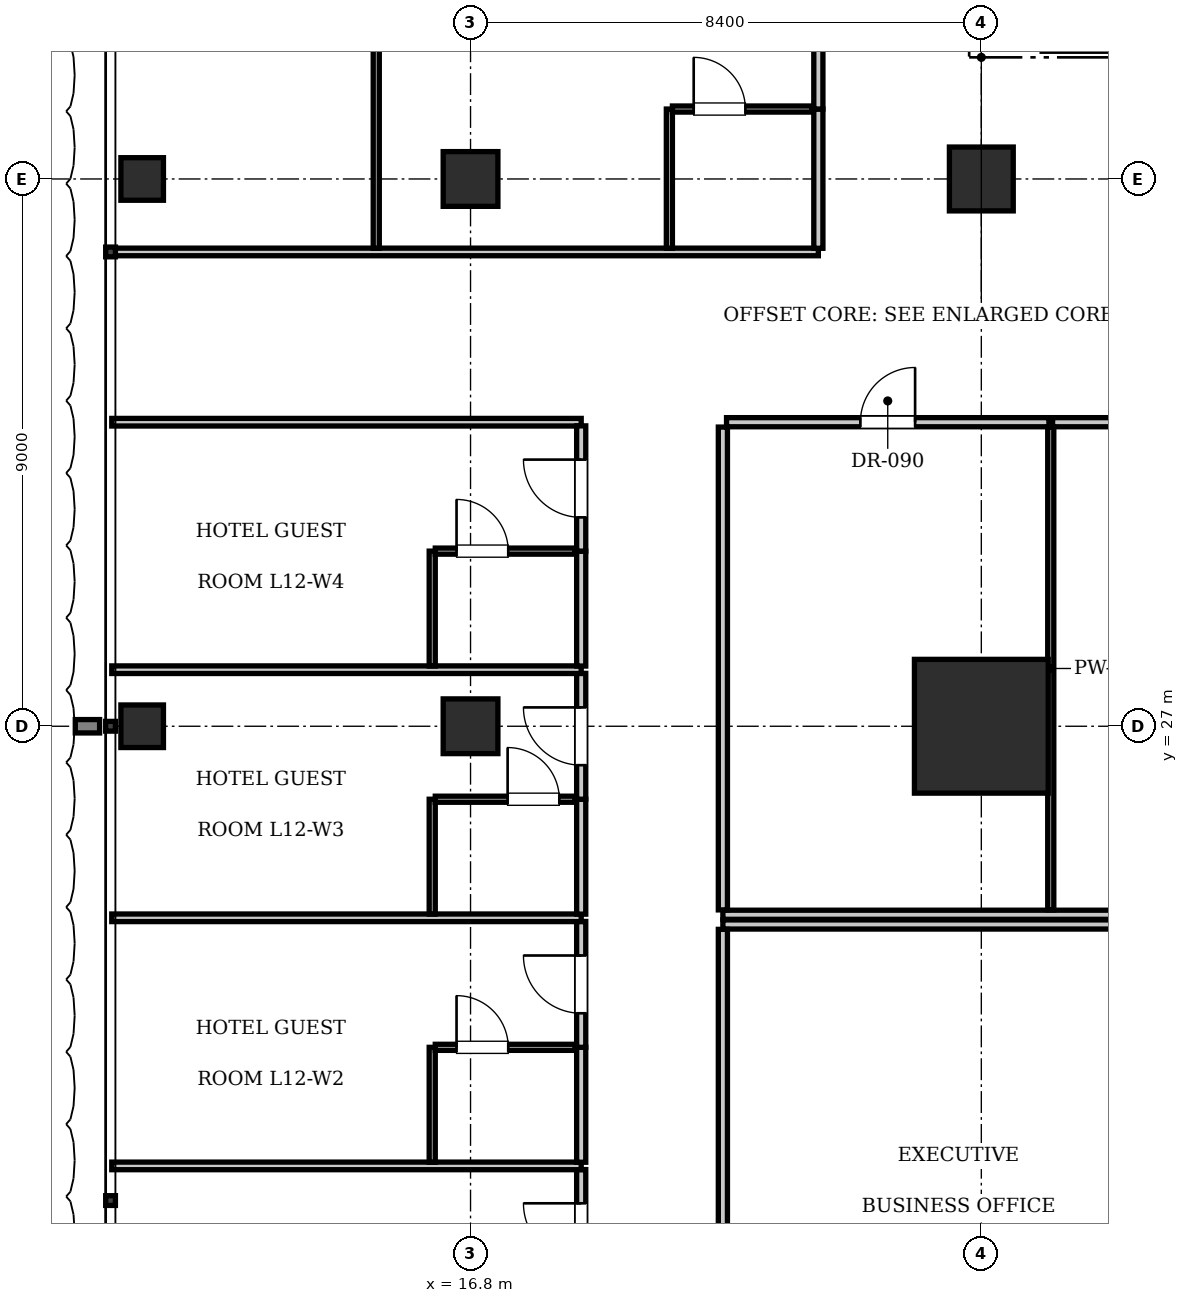
"""IFC4 building model, lengths in metres.
Left out: names, types, materials, properties, quantities, classifications, styles, units other than length and angle.
Written with IfcOpenShell. Run it as: python <this file> out.ifc"""

import sys

from ifc_helpers import new_model, si_unit, direction, frame, frame_2d, origin, origin_2d, place, context, subcontext, project, spatial, rectangle, i_section, extrude, element, fill, save


model = new_model("IFC4")
c1 = context("Model", 3, precision=1e-05, world=origin(), true_north=direction((0.0, 1.0)))
c2 = subcontext(c1, "Body", "Model", "MODEL_VIEW")
j1 = project(units=[si_unit("LENGTHUNIT", "METRE"), si_unit("PLANEANGLEUNIT", "RADIAN")], contexts=[c1])
p1 = place(None, origin())
s1 = spatial("IfcSite", under=j1, at=p1, CompositionType="ELEMENT")
p2 = place(p1, origin())
s2 = spatial("IfcBuilding", under=s1, at=p2, CompositionType="ELEMENT")
p3 = place(p2, frame((0.0, 0.0, 53.9)))
s3 = spatial("IfcBuildingStorey", under=s2, at=p3, CompositionType="ELEMENT", Elevation=53.9)
p4 = place(p3, frame((25.2, 27.0, 0.0), z_axis=(0.0, 0.0, 1.0), x_axis=(1.0, 0.0, 0.0)))
e1 = element("IfcColumn", 1, at=p4, inside=s3, PredefinedType="COLUMN", context=c2, shape_type="SweptSolid", body=[
    extrude(rectangle(XDim=2.2, YDim=2.2, at=origin_2d()), origin(), (0.0, 0.0, 1.0), 3.85),
])
p5 = place(p3, frame((25.2, 36.0, 0.0), z_axis=(0.0, 0.0, 1.0), x_axis=(1.0, 0.0, 0.0)))
e2 = element("IfcColumn", 2, at=p5, inside=s3, PredefinedType="COLUMN", context=c2, shape_type="SweptSolid", body=[
    extrude(rectangle(XDim=1.05, YDim=1.05, at=origin_2d()), origin(), (0.0, 0.0, 1.0), 3.85),
])
for number, where, z_axis, x_axis in (
    (3, (16.8, 27.0, 0.0), (0.0, 0.0, 1.0), (1.0, 0.0, 0.0)),
    (4, (16.8, 36.0, 0.0), (0.0, 0.0, 1.0), (1.0, 0.0, 0.0)),
):
    element("IfcColumn", number, at=place(p3, frame(where, z_axis=z_axis, x_axis=x_axis)), inside=s3, PredefinedType="COLUMN", context=c2, shape_type="SweptSolid", body=[
        extrude(rectangle(XDim=0.9, YDim=0.9, at=origin_2d()), origin(), (0.0, 0.0, 1.0), 3.85),
    ])
for number, where, z_axis, x_axis in (
    (5, (11.4, 27.0, 0.0), (0.0, 0.0, 1.0), (1.0, 0.0, 0.0)),
    (6, (11.4, 36.0, 0.0), (0.0, 0.0, 1.0), (1.0, 0.0, 0.0)),
):
    element("IfcColumn", number, at=place(p3, frame(where, z_axis=z_axis, x_axis=x_axis)), inside=s3, PredefinedType="COLUMN", context=c2, shape_type="SweptSolid", body=[
        extrude(i_section(OverallWidth=0.7, OverallDepth=0.7, WebThickness=0.028, FlangeThickness=0.044, at=origin_2d()), origin(), (0.0, 0.0, 1.0), 3.85),
    ])
p6 = place(p3, frame((20.95, 23.9, 0.0), z_axis=(0.0, 0.0, 1.0), x_axis=(1.0, 0.0, 0.0)))
e7 = element("IfcWall", 7, at=p6, inside=s3, PredefinedType="PARTITIONING", context=c2, shape_type="SweptSolid", body=[
    extrude(rectangle(XDim=33.7, YDim=0.15, at=frame_2d((16.85, 0.0))), origin(), (0.0, 0.0, 1.0), 3.61),
])
p7 = place(p3, frame((20.95, 23.98, 0.0), z_axis=(0.0, 0.0, 1.0), x_axis=(0.0, 1.0, 0.0)))
e8 = element("IfcWall", 8, at=p7, inside=s3, PredefinedType="PARTITIONING", context=c2, shape_type="SweptSolid", body=[
    extrude(rectangle(XDim=7.94, YDim=0.15, at=frame_2d((3.97, 0.0))), origin(), (0.0, 0.0, 1.0), 3.207),
])
p8 = place(p3, frame((21.01, 32.0, 0.0), z_axis=(0.0, 0.0, 1.0), x_axis=(1.0, 0.0, 0.0)))
e9 = element("IfcWall", 9, at=p8, inside=s3, PredefinedType="PARTITIONING", context=c2, shape_type="SweptSolid", body=[
    extrude(rectangle(XDim=5.302, YDim=0.15, at=frame_2d((2.651, 0.0))), origin(), (0.0, 0.0, 1.0), 3.61),
])
p9 = place(p8, frame((2.201, 0.0, 0.0)))
e10 = element("IfcOpeningElement", 10, at=p9, cuts=e9, PredefinedType="OPENING", context=c2, shape_type="SweptSolid", body=[
    extrude(rectangle(XDim=0.9, YDim=2.1, at=frame_2d((0.45, 1.05))), frame((0.0, 0.085, 0.0), z_axis=(0.0, -1.0, 0.0), x_axis=(1.0, 0.0, 0.0)), (0.0, 0.0, 1.0), 0.17),
])
p10 = place(p3, frame((26.342, 23.98, 0.0), z_axis=(0.0, 0.0, 1.0), x_axis=(0.0, 1.0, 0.0)))
e11 = element("IfcWall", 11, at=p10, inside=s3, PredefinedType="PARTITIONING", context=c2, shape_type="SweptSolid", body=[
    extrude(rectangle(XDim=7.94, YDim=0.1, at=frame_2d((3.97, 0.0))), origin(), (0.0, 0.0, 1.0), 3.61),
])
p11 = place(p3, frame((26.372, 32.0, 0.0), z_axis=(0.0, 0.0, 1.0), x_axis=(1.0, 0.0, 0.0)))
e12 = element("IfcWall", 12, at=p11, inside=s3, PredefinedType="PARTITIONING", context=c2, shape_type="SweptSolid", body=[
    extrude(rectangle(XDim=7.354, YDim=0.15, at=frame_2d((3.677, 0.0))), origin(), (0.0, 0.0, 1.0), 3.61),
])
p12 = place(p11, frame((3.227, 0.0, 0.0)))
e13 = element("IfcOpeningElement", 13, at=p12, cuts=e12, PredefinedType="OPENING", context=c2, shape_type="SweptSolid", body=[
    extrude(rectangle(XDim=0.9, YDim=2.1, at=frame_2d((0.45, 1.05))), frame((0.0, 0.085, 0.0), z_axis=(0.0, -1.0, 0.0), x_axis=(1.0, 0.0, 0.0)), (0.0, 0.0, 1.0), 0.17),
])
p13 = place(p3, frame((20.95, 23.74, 0.0), z_axis=(0.0, 0.0, 1.0), x_axis=(1.0, 0.0, 0.0)))
e14 = element("IfcWall", 14, at=p13, inside=s3, PredefinedType="PARTITIONING", context=c2, shape_type="SweptSolid", body=[
    extrude(rectangle(XDim=33.7, YDim=0.15, at=frame_2d((16.85, 0.0))), origin(), (0.0, 0.0, 1.0), 3.61),
])
p14 = place(p3, frame((20.95, 15.73, 0.0), z_axis=(0.0, 0.0, 1.0), x_axis=(0.0, 1.0, 0.0)))
e15 = element("IfcWall", 15, at=p14, inside=s3, PredefinedType="PARTITIONING", context=c2, shape_type="SweptSolid", body=[
    extrude(rectangle(XDim=7.93, YDim=0.15, at=frame_2d((3.965, 0.0))), origin(), (0.0, 0.0, 1.0), 3.207),
])
p15 = place(p3, frame((10.9, 32.0, 0.0), z_axis=(0.0, 0.0, 1.0), x_axis=(1.0, 0.0, 0.0)))
e16 = element("IfcWall", 16, at=p15, inside=s3, PredefinedType="PARTITIONING", context=c2, shape_type="SweptSolid", body=[
    extrude(rectangle(XDim=7.72, YDim=0.125, at=frame_2d((3.86, 0.0))), origin(), (0.0, 0.0, 1.0), 3.61),
])
p16 = place(p3, frame((18.62, 17.65, 0.0), z_axis=(0.0, 0.0, 1.0), x_axis=(0.0, 1.0, 0.0)))
e17 = element("IfcWall", 17, at=p16, inside=s3, PredefinedType="PARTITIONING", context=c2, shape_type="SweptSolid", body=[
    extrude(rectangle(XDim=2.06, YDim=0.15, at=frame_2d((1.03, 0.0))), origin(), (0.0, 0.0, 1.0), 3.61),
])
p17 = place(p16, frame((0.555, 0.0, 0.0)))
e18 = element("IfcOpeningElement", 18, at=p17, cuts=e17, PredefinedType="OPENING", context=c2, shape_type="SweptSolid", body=[
    extrude(rectangle(XDim=0.95, YDim=2.15, at=frame_2d((0.475, 1.075))), frame((0.0, 0.085, 0.0), z_axis=(0.0, -1.0, 0.0), x_axis=(1.0, 0.0, 0.0)), (0.0, 0.0, 1.0), 0.17),
])
p18 = place(p3, frame((10.9, 19.77, 0.0), z_axis=(0.0, 0.0, 1.0), x_axis=(1.0, 0.0, 0.0)))
e19 = element("IfcWall", 19, at=p18, inside=s3, PredefinedType="PARTITIONING", context=c2, shape_type="SweptSolid", body=[
    extrude(rectangle(XDim=7.72, YDim=0.125, at=frame_2d((3.86, 0.0))), origin(), (0.0, 0.0, 1.0), 3.61),
])
p19 = place(p3, frame((18.62, 19.83, 0.0), z_axis=(0.0, 0.0, 1.0), x_axis=(0.0, 1.0, 0.0)))
e20 = element("IfcWall", 20, at=p19, inside=s3, PredefinedType="PARTITIONING", context=c2, shape_type="SweptSolid", body=[
    extrude(rectangle(XDim=1.89, YDim=0.15, at=frame_2d((0.945, 0.0))), origin(), (0.0, 0.0, 1.0), 3.61),
])
p20 = place(p3, frame((18.62, 21.72, 0.0), z_axis=(0.0, 0.0, 1.0), x_axis=(0.0, 1.0, 0.0)))
e21 = element("IfcWall", 21, at=p20, inside=s3, PredefinedType="PARTITIONING", context=c2, shape_type="SweptSolid", body=[
    extrude(rectangle(XDim=2.07, YDim=0.15, at=frame_2d((1.035, 0.0))), origin(), (0.0, 0.0, 1.0), 3.61),
])
p21 = place(p20, frame((0.56, 0.0, 0.0)))
e22 = element("IfcOpeningElement", 22, at=p21, cuts=e21, PredefinedType="OPENING", context=c2, shape_type="SweptSolid", body=[
    extrude(rectangle(XDim=0.95, YDim=2.15, at=frame_2d((0.475, 1.075))), frame((0.0, 0.085, 0.0), z_axis=(0.0, -1.0, 0.0), x_axis=(1.0, 0.0, 0.0)), (0.0, 0.0, 1.0), 0.17),
])
p22 = place(p3, frame((16.17, 19.83, 0.0), z_axis=(0.0, 0.0, 1.0), x_axis=(0.0, 1.0, 0.0)))
e23 = element("IfcWall", 23, at=p22, inside=s3, PredefinedType="PARTITIONING", context=c2, shape_type="SweptSolid", body=[
    extrude(rectangle(XDim=1.89, YDim=0.1, at=frame_2d((0.945, 0.0))), origin(), (0.0, 0.0, 1.0), 3.61),
])
p23 = place(p3, frame((16.22, 21.72, 0.0), z_axis=(0.0, 0.0, 1.0), x_axis=(1.0, 0.0, 0.0)))
e24 = element("IfcWall", 24, at=p23, inside=s3, PredefinedType="PARTITIONING", context=c2, shape_type="SweptSolid", body=[
    extrude(rectangle(XDim=2.3, YDim=0.1, at=frame_2d((1.15, 0.0))), origin(), (0.0, 0.0, 1.0), 3.61),
])
p24 = place(p23, frame((0.35, 0.0, 0.0)))
e25 = element("IfcOpeningElement", 25, at=p24, cuts=e24, PredefinedType="OPENING", context=c2, shape_type="SweptSolid", body=[
    extrude(rectangle(XDim=0.85, YDim=2.1, at=frame_2d((0.425, 1.05))), frame((0.0, 0.06, 0.0), z_axis=(0.0, -1.0, 0.0), x_axis=(1.0, 0.0, 0.0)), (0.0, 0.0, 1.0), 0.12),
])
p25 = place(p3, frame((10.9, 23.85, 0.0), z_axis=(0.0, 0.0, 1.0), x_axis=(1.0, 0.0, 0.0)))
e26 = element("IfcWall", 26, at=p25, inside=s3, PredefinedType="PARTITIONING", context=c2, shape_type="SweptSolid", body=[
    extrude(rectangle(XDim=7.72, YDim=0.125, at=frame_2d((3.86, 0.0))), origin(), (0.0, 0.0, 1.0), 3.61),
])
p26 = place(p3, frame((18.62, 23.91, 0.0), z_axis=(0.0, 0.0, 1.0), x_axis=(0.0, 1.0, 0.0)))
e27 = element("IfcWall", 27, at=p26, inside=s3, PredefinedType="PARTITIONING", context=c2, shape_type="SweptSolid", body=[
    extrude(rectangle(XDim=1.89, YDim=0.15, at=frame_2d((0.945, 0.0))), origin(), (0.0, 0.0, 1.0), 3.61),
])
p27 = place(p3, frame((18.62, 25.8, 0.0), z_axis=(0.0, 0.0, 1.0), x_axis=(0.0, 1.0, 0.0)))
e28 = element("IfcWall", 28, at=p27, inside=s3, PredefinedType="PARTITIONING", context=c2, shape_type="SweptSolid", body=[
    extrude(rectangle(XDim=2.07, YDim=0.15, at=frame_2d((1.035, 0.0))), origin(), (0.0, 0.0, 1.0), 3.61),
])
p28 = place(p27, frame((0.56, 0.0, 0.0)))
e29 = element("IfcOpeningElement", 29, at=p28, cuts=e28, PredefinedType="OPENING", context=c2, shape_type="SweptSolid", body=[
    extrude(rectangle(XDim=0.95, YDim=2.15, at=frame_2d((0.475, 1.075))), frame((0.0, 0.085, 0.0), z_axis=(0.0, -1.0, 0.0), x_axis=(1.0, 0.0, 0.0)), (0.0, 0.0, 1.0), 0.17),
])
p29 = place(p3, frame((16.17, 23.91, 0.0), z_axis=(0.0, 0.0, 1.0), x_axis=(0.0, 1.0, 0.0)))
e30 = element("IfcWall", 30, at=p29, inside=s3, PredefinedType="PARTITIONING", context=c2, shape_type="SweptSolid", body=[
    extrude(rectangle(XDim=1.89, YDim=0.1, at=frame_2d((0.945, 0.0))), origin(), (0.0, 0.0, 1.0), 3.61),
])
p30 = place(p3, frame((16.22, 25.8, 0.0), z_axis=(0.0, 0.0, 1.0), x_axis=(1.0, 0.0, 0.0)))
e31 = element("IfcWall", 31, at=p30, inside=s3, PredefinedType="PARTITIONING", context=c2, shape_type="SweptSolid", body=[
    extrude(rectangle(XDim=2.3, YDim=0.1, at=frame_2d((1.15, 0.0))), origin(), (0.0, 0.0, 1.0), 3.61),
])
p31 = place(p30, frame((1.19, 0.0, 0.0)))
e32 = element("IfcOpeningElement", 32, at=p31, cuts=e31, PredefinedType="OPENING", context=c2, shape_type="SweptSolid", body=[
    extrude(rectangle(XDim=0.85, YDim=2.1, at=frame_2d((0.425, 1.05))), frame((0.0, 0.06, 0.0), z_axis=(0.0, -1.0, 0.0), x_axis=(1.0, 0.0, 0.0)), (0.0, 0.0, 1.0), 0.12),
])
p32 = place(p3, frame((10.9, 27.93, 0.0), z_axis=(0.0, 0.0, 1.0), x_axis=(1.0, 0.0, 0.0)))
e33 = element("IfcWall", 33, at=p32, inside=s3, PredefinedType="PARTITIONING", context=c2, shape_type="SweptSolid", body=[
    extrude(rectangle(XDim=7.72, YDim=0.125, at=frame_2d((3.86, 0.0))), origin(), (0.0, 0.0, 1.0), 3.61),
])
p33 = place(p3, frame((18.62, 27.99, 0.0), z_axis=(0.0, 0.0, 1.0), x_axis=(0.0, 1.0, 0.0)))
e34 = element("IfcWall", 34, at=p33, inside=s3, PredefinedType="PARTITIONING", context=c2, shape_type="SweptSolid", body=[
    extrude(rectangle(XDim=1.89, YDim=0.15, at=frame_2d((0.945, 0.0))), origin(), (0.0, 0.0, 1.0), 3.61),
])
p34 = place(p3, frame((18.62, 29.88, 0.0), z_axis=(0.0, 0.0, 1.0), x_axis=(0.0, 1.0, 0.0)))
e35 = element("IfcWall", 35, at=p34, inside=s3, PredefinedType="PARTITIONING", context=c2, shape_type="SweptSolid", body=[
    extrude(rectangle(XDim=2.06, YDim=0.15, at=frame_2d((1.03, 0.0))), origin(), (0.0, 0.0, 1.0), 3.61),
])
p35 = place(p34, frame((0.555, 0.0, 0.0)))
e36 = element("IfcOpeningElement", 36, at=p35, cuts=e35, PredefinedType="OPENING", context=c2, shape_type="SweptSolid", body=[
    extrude(rectangle(XDim=0.95, YDim=2.15, at=frame_2d((0.475, 1.075))), frame((0.0, 0.085, 0.0), z_axis=(0.0, -1.0, 0.0), x_axis=(1.0, 0.0, 0.0)), (0.0, 0.0, 1.0), 0.17),
])
p36 = place(p3, frame((16.17, 27.99, 0.0), z_axis=(0.0, 0.0, 1.0), x_axis=(0.0, 1.0, 0.0)))
e37 = element("IfcWall", 37, at=p36, inside=s3, PredefinedType="PARTITIONING", context=c2, shape_type="SweptSolid", body=[
    extrude(rectangle(XDim=1.89, YDim=0.1, at=frame_2d((0.945, 0.0))), origin(), (0.0, 0.0, 1.0), 3.61),
])
p37 = place(p3, frame((16.22, 29.88, 0.0), z_axis=(0.0, 0.0, 1.0), x_axis=(1.0, 0.0, 0.0)))
e38 = element("IfcWall", 38, at=p37, inside=s3, PredefinedType="PARTITIONING", context=c2, shape_type="SweptSolid", body=[
    extrude(rectangle(XDim=2.3, YDim=0.1, at=frame_2d((1.15, 0.0))), origin(), (0.0, 0.0, 1.0), 3.61),
])
p38 = place(p37, frame((0.35, 0.0, 0.0)))
e39 = element("IfcOpeningElement", 39, at=p38, cuts=e38, PredefinedType="OPENING", context=c2, shape_type="SweptSolid", body=[
    extrude(rectangle(XDim=0.85, YDim=2.1, at=frame_2d((0.425, 1.05))), frame((0.0, 0.06, 0.0), z_axis=(0.0, -1.0, 0.0), x_axis=(1.0, 0.0, 0.0)), (0.0, 0.0, 1.0), 0.12),
])
p39 = place(p3, frame((10.9, 34.8, 0.0), z_axis=(0.0, 0.0, 1.0), x_axis=(1.0, 0.0, 0.0)))
e40 = element("IfcWall", 40, at=p39, inside=s3, PredefinedType="PARTITIONING", context=c2, shape_type="SweptSolid", body=[
    extrude(rectangle(XDim=11.62, YDim=0.125, at=frame_2d((5.81, 0.0))), origin(), (0.0, 0.0, 1.0), 3.61),
])
p40 = place(p3, frame((22.52, 34.86, 0.0), z_axis=(0.0, 0.0, 1.0), x_axis=(0.0, 1.0, 0.0)))
e41 = element("IfcWall", 41, at=p40, inside=s3, PredefinedType="PARTITIONING", context=c2, shape_type="SweptSolid", body=[
    extrude(rectangle(XDim=2.29, YDim=0.15, at=frame_2d((1.145, 0.0))), origin(), (0.0, 0.0, 1.0), 3.61),
])
p41 = place(p3, frame((22.52, 37.15, 0.0), z_axis=(0.0, 0.0, 1.0), x_axis=(0.0, 1.0, 0.0)))
e42 = element("IfcWall", 42, at=p41, inside=s3, PredefinedType="PARTITIONING", context=c2, shape_type="SweptSolid", body=[
    extrude(rectangle(XDim=5.359, YDim=0.15, at=frame_2d((2.679, 0.0))), origin(), (0.0, 0.0, 1.0), 3.61),
])
p42 = place(p41, frame((2.204, 0.0, 0.0)))
e43 = element("IfcOpeningElement", 43, at=p42, cuts=e42, PredefinedType="OPENING", context=c2, shape_type="SweptSolid", body=[
    extrude(rectangle(XDim=0.95, YDim=2.15, at=frame_2d((0.475, 1.075))), frame((0.0, 0.085, 0.0), z_axis=(0.0, -1.0, 0.0), x_axis=(1.0, 0.0, 0.0)), (0.0, 0.0, 1.0), 0.17),
])
p43 = place(p3, frame((20.07, 34.86, 0.0), z_axis=(0.0, 0.0, 1.0), x_axis=(0.0, 1.0, 0.0)))
e44 = element("IfcWall", 44, at=p43, inside=s3, PredefinedType="PARTITIONING", context=c2, shape_type="SweptSolid", body=[
    extrude(rectangle(XDim=2.29, YDim=0.1, at=frame_2d((1.145, 0.0))), origin(), (0.0, 0.0, 1.0), 3.61),
])
p44 = place(p3, frame((20.12, 37.15, 0.0), z_axis=(0.0, 0.0, 1.0), x_axis=(1.0, 0.0, 0.0)))
e45 = element("IfcWall", 45, at=p44, inside=s3, PredefinedType="PARTITIONING", context=c2, shape_type="SweptSolid", body=[
    extrude(rectangle(XDim=2.3, YDim=0.1, at=frame_2d((1.15, 0.0))), origin(), (0.0, 0.0, 1.0), 3.61),
])
p45 = place(p44, frame((0.35, 0.0, 0.0)))
e46 = element("IfcOpeningElement", 46, at=p45, cuts=e45, PredefinedType="OPENING", context=c2, shape_type="SweptSolid", body=[
    extrude(rectangle(XDim=0.85, YDim=2.1, at=frame_2d((0.425, 1.05))), frame((0.0, 0.06, 0.0), z_axis=(0.0, -1.0, 0.0), x_axis=(1.0, 0.0, 0.0)), (0.0, 0.0, 1.0), 0.12),
])
p46 = place(p3, frame((15.25, 34.86, 0.0), z_axis=(0.0, 0.0, 1.0), x_axis=(0.0, 1.0, 0.0)))
e47 = element("IfcWall", 47, at=p46, inside=s3, PredefinedType="PARTITIONING", context=c2, shape_type="SweptSolid", body=[
    extrude(rectangle(XDim=7.649, YDim=0.1, at=frame_2d((3.824, 0.0))), origin(), (0.0, 0.0, 1.0), 3.61),
])
p47 = place(p46, frame((3.374, 0.0, 0.0)))
e48 = element("IfcOpeningElement", 48, at=p47, cuts=e47, PredefinedType="OPENING", context=c2, shape_type="SweptSolid", body=[
    extrude(rectangle(XDim=0.9, YDim=2.1, at=frame_2d((0.45, 1.05))), frame((0.0, 0.06, 0.0), z_axis=(0.0, -1.0, 0.0), x_axis=(1.0, 0.0, 0.0)), (0.0, 0.0, 1.0), 0.12),
])
p48 = place(p9, origin())
e49 = element("IfcDoor", 49, at=p48, inside=s3, OperationType="SINGLE_SWING_RIGHT", PredefinedType="DOOR", context=c2, shape_type="SweptSolid", body=[
    extrude(rectangle(XDim=0.9, YDim=2.1, at=frame_2d((0.45, 1.05))), frame((0.0, 0.025, 0.0), z_axis=(0.0, -1.0, 0.0), x_axis=(1.0, 0.0, 0.0)), (0.0, 0.0, 1.0), 0.05),
])
fill(e10, e49)
p49 = place(p17, origin())
e50 = element("IfcDoor", 50, at=p49, inside=s3, OperationType="SINGLE_SWING_RIGHT", PredefinedType="DOOR", context=c2, shape_type="SweptSolid", body=[
    extrude(rectangle(XDim=0.95, YDim=2.15, at=frame_2d((0.475, 1.075))), frame((0.0, 0.025, 0.0), z_axis=(0.0, -1.0, 0.0), x_axis=(1.0, 0.0, 0.0)), (0.0, 0.0, 1.0), 0.05),
])
fill(e18, e50)
p50 = place(p24, origin())
e51 = element("IfcDoor", 51, at=p50, inside=s3, OperationType="SINGLE_SWING_LEFT", PredefinedType="DOOR", context=c2, shape_type="SweptSolid", body=[
    extrude(rectangle(XDim=0.85, YDim=2.1, at=frame_2d((0.425, 1.05))), frame((0.0, 0.025, 0.0), z_axis=(0.0, -1.0, 0.0), x_axis=(1.0, 0.0, 0.0)), (0.0, 0.0, 1.0), 0.05),
])
fill(e25, e51)
p51 = place(p21, origin())
e52 = element("IfcDoor", 52, at=p51, inside=s3, OperationType="SINGLE_SWING_RIGHT", PredefinedType="DOOR", context=c2, shape_type="SweptSolid", body=[
    extrude(rectangle(XDim=0.95, YDim=2.15, at=frame_2d((0.475, 1.075))), frame((0.0, 0.025, 0.0), z_axis=(0.0, -1.0, 0.0), x_axis=(1.0, 0.0, 0.0)), (0.0, 0.0, 1.0), 0.05),
])
fill(e22, e52)
p52 = place(p31, origin())
e53 = element("IfcDoor", 53, at=p52, inside=s3, OperationType="SINGLE_SWING_LEFT", PredefinedType="DOOR", context=c2, shape_type="SweptSolid", body=[
    extrude(rectangle(XDim=0.85, YDim=2.1, at=frame_2d((0.425, 1.05))), frame((0.0, 0.025, 0.0), z_axis=(0.0, -1.0, 0.0), x_axis=(1.0, 0.0, 0.0)), (0.0, 0.0, 1.0), 0.05),
])
fill(e32, e53)
p53 = place(p28, origin())
e54 = element("IfcDoor", 54, at=p53, inside=s3, OperationType="SINGLE_SWING_RIGHT", PredefinedType="DOOR", context=c2, shape_type="SweptSolid", body=[
    extrude(rectangle(XDim=0.95, YDim=2.15, at=frame_2d((0.475, 1.075))), frame((0.0, 0.025, 0.0), z_axis=(0.0, -1.0, 0.0), x_axis=(1.0, 0.0, 0.0)), (0.0, 0.0, 1.0), 0.05),
])
fill(e29, e54)
p54 = place(p38, origin())
e55 = element("IfcDoor", 55, at=p54, inside=s3, OperationType="SINGLE_SWING_LEFT", PredefinedType="DOOR", context=c2, shape_type="SweptSolid", body=[
    extrude(rectangle(XDim=0.85, YDim=2.1, at=frame_2d((0.425, 1.05))), frame((0.0, 0.025, 0.0), z_axis=(0.0, -1.0, 0.0), x_axis=(1.0, 0.0, 0.0)), (0.0, 0.0, 1.0), 0.05),
])
fill(e39, e55)
p55 = place(p35, origin())
e56 = element("IfcDoor", 56, at=p55, inside=s3, OperationType="SINGLE_SWING_RIGHT", PredefinedType="DOOR", context=c2, shape_type="SweptSolid", body=[
    extrude(rectangle(XDim=0.95, YDim=2.15, at=frame_2d((0.475, 1.075))), frame((0.0, 0.025, 0.0), z_axis=(0.0, -1.0, 0.0), x_axis=(1.0, 0.0, 0.0)), (0.0, 0.0, 1.0), 0.05),
])
fill(e36, e56)
p56 = place(p45, origin())
e57 = element("IfcDoor", 57, at=p56, inside=s3, OperationType="SINGLE_SWING_LEFT", PredefinedType="DOOR", context=c2, shape_type="SweptSolid", body=[
    extrude(rectangle(XDim=0.85, YDim=2.1, at=frame_2d((0.425, 1.05))), frame((0.0, 0.025, 0.0), z_axis=(0.0, -1.0, 0.0), x_axis=(1.0, 0.0, 0.0)), (0.0, 0.0, 1.0), 0.05),
])
fill(e46, e57)
save(model, sys.argv[1])
